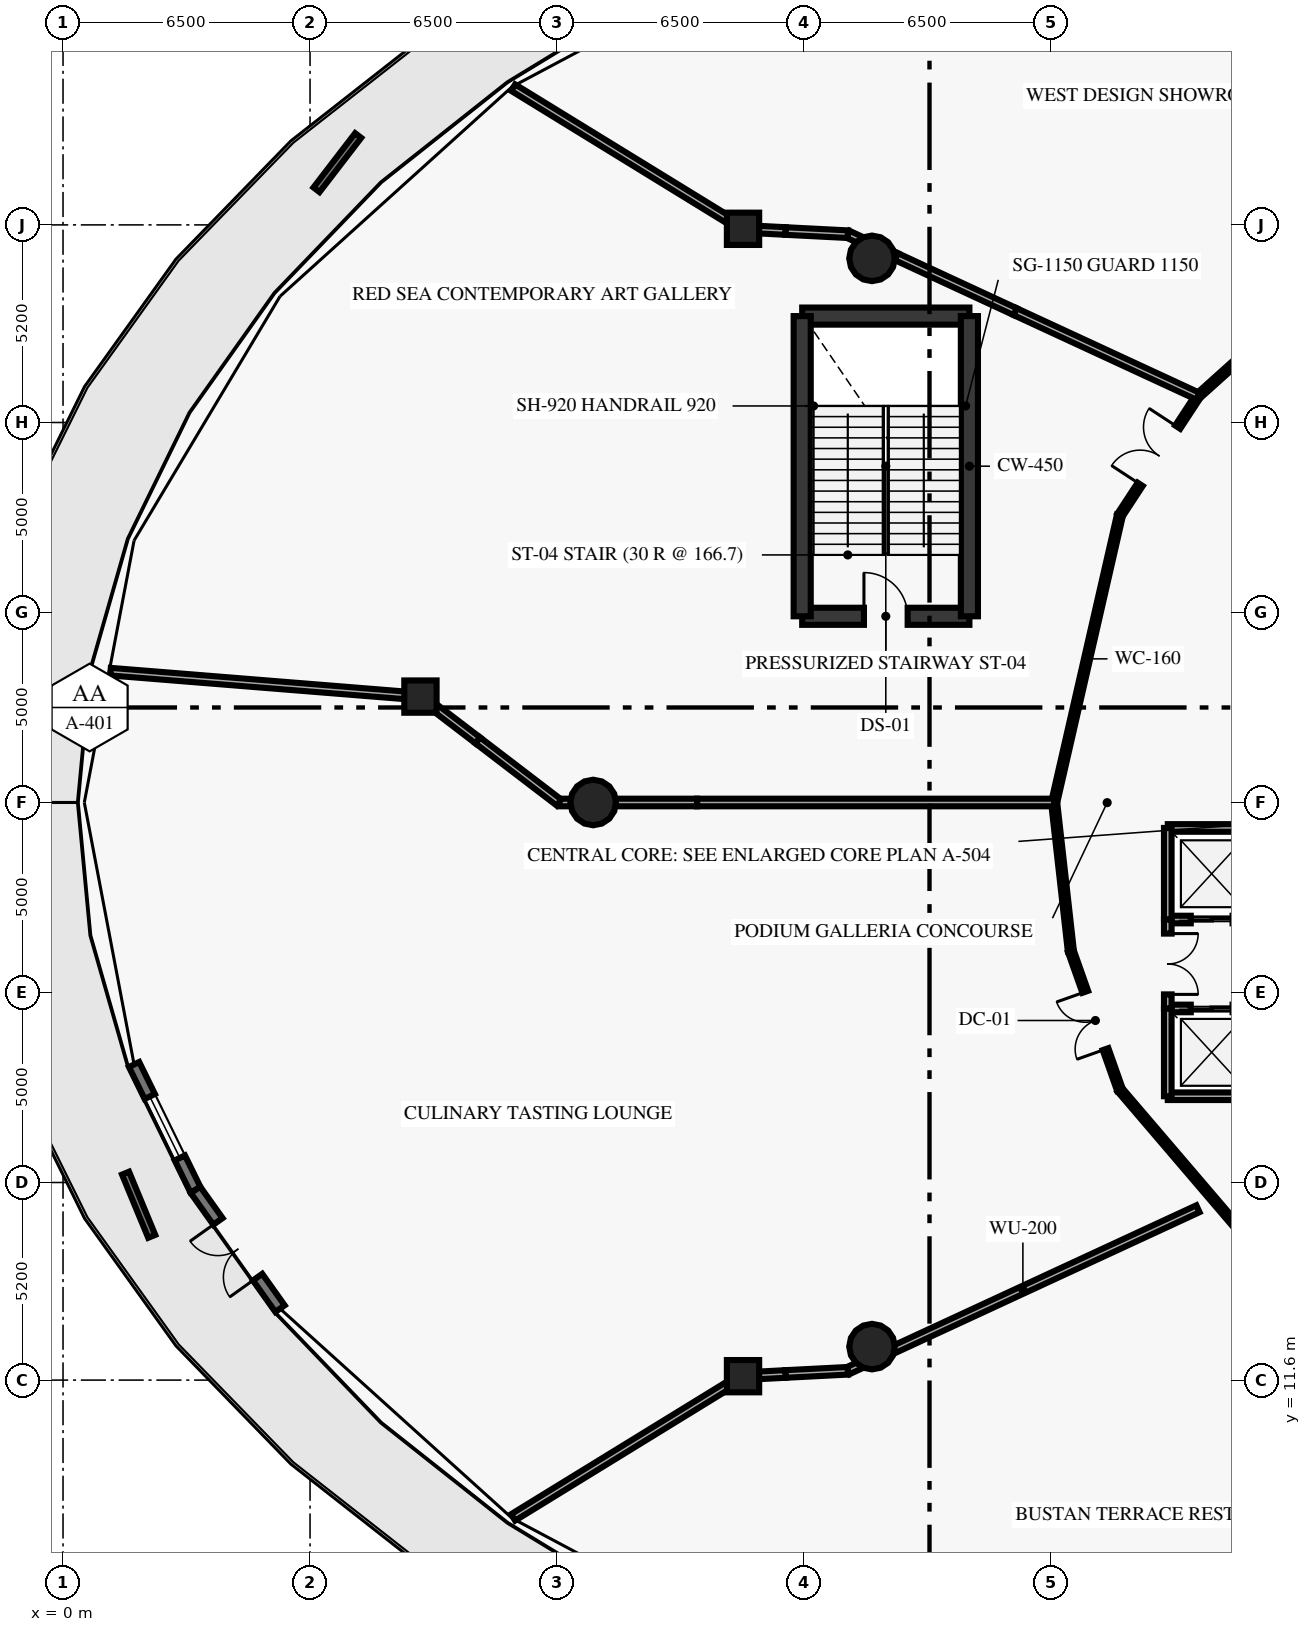
"""IFC4 building model, lengths in metres.
Left out: names, types, materials, properties, quantities, classifications, styles, units other than length and angle.
Written with IfcOpenShell. Run it as: python <this file> out.ifc"""

import sys

from ifc_helpers import new_model, si_unit, direction, frame, frame_2d, origin, origin_2d, place, context, subcontext, project, spatial, rectangle, circle, extrude, element, fill, save


model = new_model("IFC4")
c1 = context("Model", 3, precision=1e-05, world=origin(), true_north=direction((0.0, 1.0)))
c2 = subcontext(c1, "Body", "Model", "MODEL_VIEW")
j1 = project(units=[si_unit("LENGTHUNIT", "METRE"), si_unit("PLANEANGLEUNIT", "RADIAN")], contexts=[c1])
p1 = place(None, origin())
s1 = spatial("IfcSite", under=j1, at=p1, CompositionType="ELEMENT")
p2 = place(p1, origin())
s2 = spatial("IfcBuilding", under=s1, at=p2, CompositionType="ELEMENT")
p3 = place(p2, frame((0.0, 0.0, 6.0)))
s3 = spatial("IfcBuildingStorey", under=s2, at=p3, CompositionType="ELEMENT", Elevation=6.0)
for number, where, z_axis, x_axis in (
    (1, (21.287, 41.119, 0.0), (0.0, 0.0, 1.0), (1.0, 0.0, 0.0)),
    (2, (13.95, 26.8, 0.0), (0.0, 0.0, 1.0), (1.0, 0.0, 0.0)),
    (3, (21.287, 12.481, 0.0), (0.0, 0.0, 1.0), (1.0, 0.0, 0.0)),
):
    element("IfcColumn", number, at=place(p3, frame(where, z_axis=z_axis, x_axis=x_axis)), inside=s3, PredefinedType="COLUMN", context=c2, shape_type="SweptSolid", body=[
        extrude(circle(Radius=0.6, at=origin_2d()), origin(), (0.0, 0.0, 1.0), 4.7),
    ])
for number, where, z_axis, x_axis in (
    (4, (17.893, 41.897, 0.0), (0.0, 0.0, 1.0), (1.0, 0.0, 0.0)),
    (5, (9.405, 29.587, 0.0), (0.0, 0.0, 1.0), (1.0, 0.0, 0.0)),
    (6, (17.893, 11.703, 0.0), (0.0, 0.0, 1.0), (1.0, 0.0, 0.0)),
):
    element("IfcColumn", number, at=place(p3, frame(where, z_axis=z_axis, x_axis=x_axis)), inside=s3, PredefinedType="COLUMN", context=c2, shape_type="SweptSolid", body=[
        extrude(rectangle(XDim=0.85, YDim=0.85, at=origin_2d()), origin(), (0.0, 0.0, 1.0), 4.7),
    ])
p4 = place(p3, frame((3.486, 16.605, 0.0), z_axis=(0.0, 0.0, 1.0), x_axis=(-0.4397832387, 0.89810394886, 0.0)))
e7 = element("IfcWall", 7, at=p4, inside=s3, PredefinedType="STANDARD", context=c2, shape_type="SweptSolid", body=[
    extrude(rectangle(XDim=3.675, YDim=0.3, at=frame_2d((1.837, 0.0))), origin(), (0.0, 0.0, 1.0), 4.7),
])
p5 = place(p4, frame((0.937, 0.0, 0.9)))
e8 = element("IfcOpeningElement", 8, at=p5, cuts=e7, PredefinedType="OPENING", context=c2, shape_type="SweptSolid", body=[
    extrude(rectangle(XDim=1.8, YDim=2.4, at=frame_2d((0.9, 1.2))), frame((0.0, 0.16, 0.0), z_axis=(0.0, -1.0, 0.0), x_axis=(1.0, 0.0, 0.0)), (0.0, 0.0, 1.0), 0.32),
])
p6 = place(p3, frame((5.71, 13.48, 0.0), z_axis=(0.0, 0.0, 1.0), x_axis=(-0.579810280566, 0.814751519514, 0.0)))
e9 = element("IfcWall", 9, at=p6, inside=s3, PredefinedType="STANDARD", context=c2, shape_type="SweptSolid", body=[
    extrude(rectangle(XDim=3.835, YDim=0.3, at=frame_2d((1.918, 0.0))), origin(), (0.0, 0.0, 1.0), 4.7),
])
p7 = place(p6, frame((1.018, 0.0, 0.0)))
e10 = element("IfcOpeningElement", 10, at=p7, cuts=e9, PredefinedType="OPENING", context=c2, shape_type="SweptSolid", body=[
    extrude(rectangle(XDim=1.8, YDim=2.25, at=frame_2d((0.9, 1.125))), frame((0.0, 0.16, 0.0), z_axis=(0.0, -1.0, 0.0), x_axis=(1.0, 0.0, 0.0)), (0.0, 0.0, 1.0), 0.32),
])
p8 = place(p3, frame((6.67, 42.924, 0.0), z_axis=(0.0, 0.0, 1.0), x_axis=(0.608923978219, 0.793228585434, 0.0)))
e11 = element("IfcWall", 11, at=p8, inside=s3, PredefinedType="ELEMENTEDWALL", context=c2, shape_type="SweptSolid", body=[
    extrude(rectangle(XDim=1.8, YDim=0.2, at=frame_2d((0.9, 0.0))), origin(), (0.0, 0.0, 1.0), 0.65),
])
p9 = place(p3, frame((2.334, 15.383, 0.0), z_axis=(0.0, 0.0, 1.0), x_axis=(-0.382775058439, 0.923841574425, 0.0)))
e12 = element("IfcWall", 12, at=p9, inside=s3, PredefinedType="ELEMENTEDWALL", context=c2, shape_type="SweptSolid", body=[
    extrude(rectangle(XDim=1.8, YDim=0.2, at=frame_2d((0.9, 0.0))), origin(), (0.0, 0.0, 1.0), 0.65),
])
p10 = place(p3, frame((19.45, 31.7, 0.0), z_axis=(0.0, 0.0, 1.0), x_axis=(1.0, 0.0, 0.0)))
e13 = element("IfcWall", 13, at=p10, inside=s3, PredefinedType="SHEAR", context=c2, shape_type="SweptSolid", body=[
    extrude(rectangle(XDim=4.4, YDim=0.45, at=frame_2d((2.2, 0.0))), origin(), (0.0, 0.0, 1.0), 4.7),
])
p11 = place(p10, frame((1.625, 0.0, 0.0)))
e14 = element("IfcOpeningElement", 14, at=p11, cuts=e13, PredefinedType="OPENING", context=c2, shape_type="SweptSolid", body=[
    extrude(rectangle(XDim=1.15, YDim=2.15, at=frame_2d((0.575, 1.075))), frame((0.0, 0.235, 0.0), z_axis=(0.0, -1.0, 0.0), x_axis=(1.0, 0.0, 0.0)), (0.0, 0.0, 1.0), 0.47),
])
p12 = place(p3, frame((19.45, 39.6, 0.0), z_axis=(0.0, 0.0, 1.0), x_axis=(1.0, 0.0, 0.0)))
e15 = element("IfcWall", 15, at=p12, inside=s3, PredefinedType="SHEAR", context=c2, shape_type="SweptSolid", body=[
    extrude(rectangle(XDim=4.4, YDim=0.45, at=frame_2d((2.2, 0.0))), origin(), (0.0, 0.0, 1.0), 4.7),
])
for number, where, z_axis, x_axis in (
    (16, (19.45, 31.7, 0.0), (0.0, 0.0, 1.0), (0.0, 1.0, 0.0)),
    (17, (23.85, 31.7, 0.0), (0.0, 0.0, 1.0), (0.0, 1.0, 0.0)),
):
    element("IfcWall", number, at=place(p3, frame(where, z_axis=z_axis, x_axis=x_axis)), inside=s3, PredefinedType="SHEAR", context=c2, shape_type="SweptSolid", body=[
        extrude(rectangle(XDim=7.9, YDim=0.45, at=frame_2d((3.95, 0.0))), origin(), (0.0, 0.0, 1.0), 4.7),
    ])
p13 = place(p3, frame((29.07, 23.72, 0.0), z_axis=(0.0, 0.0, 1.0), x_axis=(1.0, 0.0, 0.0)))
e18 = element("IfcWall", 18, at=p13, inside=s3, PredefinedType="SOLIDWALL", context=c2, shape_type="SweptSolid", body=[
    extrude(rectangle(XDim=2.31, YDim=0.2, at=frame_2d((1.155, 0.0))), origin(), (0.0, 0.0, 1.0), 4.7),
])
p14 = place(p13, frame((0.605, 0.0, 0.0)))
e19 = element("IfcOpeningElement", 19, at=p14, cuts=e18, PredefinedType="OPENING", context=c2, shape_type="SweptSolid", body=[
    extrude(rectangle(XDim=1.1, YDim=2.15, at=frame_2d((0.55, 1.075))), frame((0.0, 0.11, 0.0), z_axis=(0.0, -1.0, 0.0), x_axis=(1.0, 0.0, 0.0)), (0.0, 0.0, 1.0), 0.22),
])
p15 = place(p3, frame((29.07, 26.13, 0.0), z_axis=(0.0, 0.0, 1.0), x_axis=(1.0, 0.0, 0.0)))
e20 = element("IfcWall", 20, at=p15, inside=s3, PredefinedType="SOLIDWALL", context=c2, shape_type="SweptSolid", body=[
    extrude(rectangle(XDim=2.31, YDim=0.2, at=frame_2d((1.155, 0.0))), origin(), (0.0, 0.0, 1.0), 4.7),
])
p16 = place(p3, frame((29.07, 23.72, 0.0), z_axis=(0.0, 0.0, 1.0), x_axis=(0.0, 1.0, 0.0)))
e21 = element("IfcWall", 21, at=p16, inside=s3, PredefinedType="SOLIDWALL", context=c2, shape_type="SweptSolid", body=[
    extrude(rectangle(XDim=2.41, YDim=0.2, at=frame_2d((1.205, 0.0))), origin(), (0.0, 0.0, 1.0), 4.7),
])
p17 = place(p3, frame((29.07, 19.07, 0.0), z_axis=(0.0, 0.0, 1.0), x_axis=(1.0, 0.0, 0.0)))
e22 = element("IfcWall", 22, at=p17, inside=s3, PredefinedType="SOLIDWALL", context=c2, shape_type="SweptSolid", body=[
    extrude(rectangle(XDim=2.31, YDim=0.2, at=frame_2d((1.155, 0.0))), origin(), (0.0, 0.0, 1.0), 4.7),
])
p18 = place(p3, frame((29.07, 21.38, 0.0), z_axis=(0.0, 0.0, 1.0), x_axis=(1.0, 0.0, 0.0)))
e23 = element("IfcWall", 23, at=p18, inside=s3, PredefinedType="SOLIDWALL", context=c2, shape_type="SweptSolid", body=[
    extrude(rectangle(XDim=2.31, YDim=0.2, at=frame_2d((1.155, 0.0))), origin(), (0.0, 0.0, 1.0), 4.7),
])
p19 = place(p18, frame((0.605, 0.0, 0.0)))
e24 = element("IfcOpeningElement", 24, at=p19, cuts=e23, PredefinedType="OPENING", context=c2, shape_type="SweptSolid", body=[
    extrude(rectangle(XDim=1.1, YDim=2.15, at=frame_2d((0.55, 1.075))), frame((0.0, 0.11, 0.0), z_axis=(0.0, -1.0, 0.0), x_axis=(1.0, 0.0, 0.0)), (0.0, 0.0, 1.0), 0.22),
])
p20 = place(p3, frame((29.07, 19.07, 0.0), z_axis=(0.0, 0.0, 1.0), x_axis=(0.0, 1.0, 0.0)))
e25 = element("IfcWall", 25, at=p20, inside=s3, PredefinedType="SOLIDWALL", context=c2, shape_type="SweptSolid", body=[
    extrude(rectangle(XDim=2.31, YDim=0.2, at=frame_2d((1.155, 0.0))), origin(), (0.0, 0.0, 1.0), 4.7),
])
p21 = place(p3, frame((29.07, 21.38, 0.0), z_axis=(0.0, 0.0, 1.0), x_axis=(0.0, 1.0, 0.0)))
e26 = element("IfcWall", 26, at=p21, inside=s3, PredefinedType="SOLIDWALL", context=c2, shape_type="SweptSolid", body=[
    extrude(rectangle(XDim=2.34, YDim=0.2, at=frame_2d((1.17, 0.0))), origin(), (0.0, 0.0, 1.0), 4.7),
])
p22 = place(p21, frame((0.37, 0.0, 0.0)))
e27 = element("IfcOpeningElement", 27, at=p22, cuts=e26, PredefinedType="OPENING", context=c2, shape_type="SweptSolid", body=[
    extrude(rectangle(XDim=1.6, YDim=2.2, at=frame_2d((0.8, 1.1))), frame((0.0, 0.11, 0.0), z_axis=(0.0, -1.0, 0.0), x_axis=(1.0, 0.0, 0.0)), (0.0, 0.0, 1.0), 0.22),
])
p23 = place(p3, frame((32.54, 39.894, 0.0), z_axis=(0.0, 0.0, 1.0), x_axis=(-0.744032872127, -0.668143012531, 0.0)))
e28 = element("IfcWall", 28, at=p23, inside=s3, PredefinedType="PARTITIONING", context=c2, shape_type="SweptSolid", body=[
    extrude(rectangle(XDim=3.597, YDim=0.16, at=frame_2d((1.798, 0.0))), origin(), (0.0, 0.0, 1.0), 4.7),
])
p24 = place(p3, frame((27.811, 34.36, 0.0), z_axis=(0.0, 0.0, 1.0), x_axis=(0.548348738977, 0.836249759619, 0.0)))
e29 = element("IfcWall", 29, at=p24, inside=s3, PredefinedType="PARTITIONING", context=c2, shape_type="SweptSolid", body=[
    extrude(rectangle(XDim=3.744, YDim=0.16, at=frame_2d((1.872, 0.0))), origin(), (0.0, 0.0, 1.0), 4.7),
])
p25 = place(p24, frame((0.972, 0.0, 0.0)))
e30 = element("IfcOpeningElement", 30, at=p25, cuts=e29, PredefinedType="OPENING", context=c2, shape_type="SweptSolid", body=[
    extrude(rectangle(XDim=1.8, YDim=2.3, at=frame_2d((0.9, 1.15))), frame((0.0, 0.09, 0.0), z_axis=(0.0, -1.0, 0.0), x_axis=(1.0, 0.0, 0.0)), (0.0, 0.0, 1.0), 0.18),
])
p26 = place(p3, frame((27.811, 34.36, 0.0), z_axis=(0.0, 0.0, 1.0), x_axis=(-0.223185487206, -0.974775993909, 0.0)))
e31 = element("IfcWall", 31, at=p26, inside=s3, PredefinedType="PARTITIONING", context=c2, shape_type="SweptSolid", body=[
    extrude(rectangle(XDim=7.756, YDim=0.16, at=frame_2d((3.878, 0.0))), origin(), (0.0, 0.0, 1.0), 4.7),
])
p27 = place(p3, frame((26.08, 26.8, 0.0), z_axis=(0.0, 0.0, 1.0), x_axis=(0.111724363671, -0.99373923469, 0.0)))
e32 = element("IfcWall", 32, at=p27, inside=s3, PredefinedType="PARTITIONING", context=c2, shape_type="SweptSolid", body=[
    extrude(rectangle(XDim=3.938, YDim=0.16, at=frame_2d((1.969, 0.0))), origin(), (0.0, 0.0, 1.0), 4.7),
])
p28 = place(p3, frame((27.811, 19.24, 0.0), z_axis=(0.0, 0.0, 1.0), x_axis=(-0.333704620558, 0.942677689467, 0.0)))
e33 = element("IfcWall", 33, at=p28, inside=s3, PredefinedType="PARTITIONING", context=c2, shape_type="SweptSolid", body=[
    extrude(rectangle(XDim=3.869, YDim=0.16, at=frame_2d((1.934, 0.0))), origin(), (0.0, 0.0, 1.0), 4.7),
])
p29 = place(p28, frame((1.134, 0.0, 0.0)))
e34 = element("IfcOpeningElement", 34, at=p29, cuts=e33, PredefinedType="OPENING", context=c2, shape_type="SweptSolid", body=[
    extrude(rectangle(XDim=1.6, YDim=2.2, at=frame_2d((0.8, 1.1))), frame((0.0, 0.09, 0.0), z_axis=(0.0, -1.0, 0.0), x_axis=(1.0, 0.0, 0.0)), (0.0, 0.0, 1.0), 0.18),
])
p30 = place(p3, frame((27.811, 19.24, 0.0), z_axis=(0.0, 0.0, 1.0), x_axis=(0.649652680018, -0.760231145998, 0.0)))
e35 = element("IfcWall", 35, at=p30, inside=s3, PredefinedType="PARTITIONING", context=c2, shape_type="SweptSolid", body=[
    extrude(rectangle(XDim=7.279, YDim=0.16, at=frame_2d((3.64, 0.0))), origin(), (0.0, 0.0, 1.0), 4.7),
])
p31 = place(p3, frame((29.864, 37.491, 0.0), z_axis=(0.0, 0.0, 1.0), x_axis=(-0.907524785669, 0.419998527851, 0.0)))
e36 = element("IfcWall", 36, at=p31, inside=s3, PredefinedType="PARTITIONING", context=c2, shape_type="SweptSolid", body=[
    extrude(rectangle(XDim=5.3, YDim=0.2, at=frame_2d((2.65, 0.0))), origin(), (0.0, 0.0, 1.0), 4.7),
])
p32 = place(p3, frame((25.054, 39.717, 0.0), z_axis=(0.0, 0.0, 1.0), x_axis=(-0.90747190463, 0.420112773321, 0.0)))
e37 = element("IfcWall", 37, at=p32, inside=s3, PredefinedType="PARTITIONING", context=c2, shape_type="SweptSolid", body=[
    extrude(rectangle(XDim=3.449, YDim=0.2, at=frame_2d((1.725, 0.0))), origin(), (0.0, 0.0, 1.0), 3.92),
])
p33 = place(p3, frame((21.924, 41.166, 0.0), z_axis=(0.0, 0.0, 1.0), x_axis=(-0.907622896373, 0.419786467124, 0.0)))
e38 = element("IfcWall", 38, at=p33, inside=s3, PredefinedType="PARTITIONING", context=c2, shape_type="SweptSolid", body=[
    extrude(rectangle(XDim=1.403, YDim=0.2, at=frame_2d((0.701, 0.0))), origin(), (0.0, 0.0, 1.0), 4.7),
])
p34 = place(p3, frame((20.651, 41.755, 0.0), z_axis=(0.0, 0.0, 1.0), x_axis=(-0.998685128887, 0.051264152576, 0.0)))
e39 = element("IfcWall", 39, at=p34, inside=s3, PredefinedType="PARTITIONING", context=c2, shape_type="SweptSolid", body=[
    extrude(rectangle(XDim=1.643, YDim=0.2, at=frame_2d((0.822, 0.0))), origin(), (0.0, 0.0, 1.0), 4.7),
])
p35 = place(p3, frame((19.01, 41.839, 0.0), z_axis=(0.0, 0.0, 1.0), x_axis=(-0.998660904733, 0.051733909163, 0.0)))
e40 = element("IfcWall", 40, at=p35, inside=s3, PredefinedType="PARTITIONING", context=c2, shape_type="SweptSolid", body=[
    extrude(rectangle(XDim=1.118, YDim=0.2, at=frame_2d((0.559, 0.0))), origin(), (0.0, 0.0, 1.0), 4.24),
])
p36 = place(p3, frame((17.893, 41.897, 0.0), z_axis=(0.0, 0.0, 1.0), x_axis=(-0.85206305886, 0.523439149974, 0.0)))
e41 = element("IfcWall", 41, at=p36, inside=s3, PredefinedType="PARTITIONING", context=c2, shape_type="SweptSolid", body=[
    extrude(rectangle(XDim=7.099, YDim=0.2, at=frame_2d((3.55, 0.0))), origin(), (0.0, 0.0, 1.0), 4.7),
])
p37 = place(p3, frame((26.08, 26.8, 0.0), z_axis=(0.0, 0.0, 1.0), x_axis=(-1.0, 0.0, 0.0)))
e42 = element("IfcWall", 42, at=p37, inside=s3, PredefinedType="PARTITIONING", context=c2, shape_type="SweptSolid", body=[
    extrude(rectangle(XDim=9.397, YDim=0.2, at=frame_2d((4.698, 0.0))), origin(), (0.0, 0.0, 1.0), 4.7),
])
p38 = place(p3, frame((16.683, 26.8, 0.0), z_axis=(0.0, 0.0, 1.0), x_axis=(-1.0, 0.0, 0.0)))
e43 = element("IfcWall", 43, at=p38, inside=s3, PredefinedType="PARTITIONING", context=c2, shape_type="SweptSolid", body=[
    extrude(rectangle(XDim=2.744, YDim=0.2, at=frame_2d((1.372, 0.0))), origin(), (0.0, 0.0, 1.0), 3.66),
])
p39 = place(p3, frame((13.939, 26.8, 0.0), z_axis=(0.0, 0.0, 1.0), x_axis=(-1.0, 0.0, 0.0)))
e44 = element("IfcWall", 44, at=p39, inside=s3, PredefinedType="PARTITIONING", context=c2, shape_type="SweptSolid", body=[
    extrude(rectangle(XDim=0.889, YDim=0.2, at=frame_2d((0.444, 0.0))), origin(), (0.0, 0.0, 1.0), 4.7),
])
p40 = place(p3, frame((13.05, 26.8, 0.0), z_axis=(0.0, 0.0, 1.0), x_axis=(-0.794337234882, 0.607477042595, 0.0)))
e45 = element("IfcWall", 45, at=p40, inside=s3, PredefinedType="PARTITIONING", context=c2, shape_type="SweptSolid", body=[
    extrude(rectangle(XDim=2.691, YDim=0.2, at=frame_2d((1.346, 0.0))), origin(), (0.0, 0.0, 1.0), 4.7),
])
p41 = place(p3, frame((10.912, 28.435, 0.0), z_axis=(0.0, 0.0, 1.0), x_axis=(-0.794514897702, 0.607244660191, 0.0)))
e46 = element("IfcWall", 46, at=p41, inside=s3, PredefinedType="PARTITIONING", context=c2, shape_type="SweptSolid", body=[
    extrude(rectangle(XDim=1.897, YDim=0.2, at=frame_2d((0.948, 0.0))), origin(), (0.0, 0.0, 1.0), 4.24),
])
p42 = place(p3, frame((9.405, 29.587, 0.0), z_axis=(0.0, 0.0, 1.0), x_axis=(-0.996780937532, 0.080173328319, 0.0)))
e47 = element("IfcWall", 47, at=p42, inside=s3, PredefinedType="PARTITIONING", context=c2, shape_type="SweptSolid", body=[
    extrude(rectangle(XDim=8.182, YDim=0.2, at=frame_2d((4.091, 0.0))), origin(), (0.0, 0.0, 1.0), 4.7),
])
p43 = place(p3, frame((29.864, 16.109, 0.0), z_axis=(0.0, 0.0, 1.0), x_axis=(-0.907520382507, -0.420008041988, 0.0)))
e48 = element("IfcWall", 48, at=p43, inside=s3, PredefinedType="PARTITIONING", context=c2, shape_type="SweptSolid", body=[
    extrude(rectangle(XDim=10.152, YDim=0.2, at=frame_2d((5.076, 0.0))), origin(), (0.0, 0.0, 1.0), 4.7),
])
p44 = place(p3, frame((20.651, 11.845, 0.0), z_axis=(0.0, 0.0, 1.0), x_axis=(-0.998692725363, -0.051115949639, 0.0)))
e49 = element("IfcWall", 49, at=p44, inside=s3, PredefinedType="PARTITIONING", context=c2, shape_type="SweptSolid", body=[
    extrude(rectangle(XDim=1.643, YDim=0.2, at=frame_2d((0.822, 0.0))), origin(), (0.0, 0.0, 1.0), 4.7),
])
p45 = place(p3, frame((19.01, 11.761, 0.0), z_axis=(0.0, 0.0, 1.0), x_axis=(-0.998649603439, -0.051951607785, 0.0)))
e50 = element("IfcWall", 50, at=p45, inside=s3, PredefinedType="PARTITIONING", context=c2, shape_type="SweptSolid", body=[
    extrude(rectangle(XDim=1.118, YDim=0.2, at=frame_2d((0.559, 0.0))), origin(), (0.0, 0.0, 1.0), 4.24),
])
p46 = place(p3, frame((17.893, 11.703, 0.0), z_axis=(0.0, 0.0, 1.0), x_axis=(-0.852078396496, -0.523414182293, 0.0)))
e51 = element("IfcWall", 51, at=p46, inside=s3, PredefinedType="PARTITIONING", context=c2, shape_type="SweptSolid", body=[
    extrude(rectangle(XDim=7.099, YDim=0.2, at=frame_2d((3.55, 0.0))), origin(), (0.0, 0.0, 1.0), 4.7),
])
p47 = place(p5, origin())
e52 = element("IfcWindow", 52, at=p47, inside=s3, PartitioningType="DOUBLE_PANEL_VERTICAL", PredefinedType="WINDOW", context=c2, shape_type="SweptSolid", body=[
    extrude(rectangle(XDim=1.8, YDim=2.4, at=frame_2d((0.9, 1.2))), frame((0.0, 0.03, 0.0), z_axis=(0.0, -1.0, 0.0), x_axis=(1.0, 0.0, 0.0)), (0.0, 0.0, 1.0), 0.06),
])
fill(e8, e52)
p48 = place(p7, origin())
e53 = element("IfcDoor", 53, at=p48, inside=s3, OperationType="DOUBLE_DOOR_SINGLE_SWING", PredefinedType="DOOR", context=c2, shape_type="SweptSolid", body=[
    extrude(rectangle(XDim=1.8, YDim=2.25, at=frame_2d((0.9, 1.125))), frame((0.0, 0.025, 0.0), z_axis=(0.0, -1.0, 0.0), x_axis=(1.0, 0.0, 0.0)), (0.0, 0.0, 1.0), 0.05),
])
fill(e10, e53)
p49 = place(p11, origin())
e54 = element("IfcDoor", 54, at=p49, inside=s3, OperationType="SINGLE_SWING_LEFT", PredefinedType="DOOR", context=c2, shape_type="SweptSolid", body=[
    extrude(rectangle(XDim=1.15, YDim=2.15, at=frame_2d((0.575, 1.075))), frame((0.0, 0.025, 0.0), z_axis=(0.0, -1.0, 0.0), x_axis=(1.0, 0.0, 0.0)), (0.0, 0.0, 1.0), 0.05),
])
fill(e14, e54)
p50 = place(p14, origin())
e55 = element("IfcDoor", 55, at=p50, inside=s3, OperationType="DOUBLE_DOOR_SLIDING", PredefinedType="DOOR", context=c2, shape_type="SweptSolid", body=[
    extrude(rectangle(XDim=1.1, YDim=2.15, at=frame_2d((0.55, 1.075))), frame((0.0, 0.025, 0.0), z_axis=(0.0, -1.0, 0.0), x_axis=(1.0, 0.0, 0.0)), (0.0, 0.0, 1.0), 0.05),
])
fill(e19, e55)
p51 = place(p19, origin())
e56 = element("IfcDoor", 56, at=p51, inside=s3, OperationType="DOUBLE_DOOR_SLIDING", PredefinedType="DOOR", context=c2, shape_type="SweptSolid", body=[
    extrude(rectangle(XDim=1.1, YDim=2.15, at=frame_2d((0.55, 1.075))), frame((0.0, 0.025, 0.0), z_axis=(0.0, -1.0, 0.0), x_axis=(1.0, 0.0, 0.0)), (0.0, 0.0, 1.0), 0.05),
])
fill(e24, e56)
p52 = place(p22, origin())
e57 = element("IfcDoor", 57, at=p52, inside=s3, OperationType="DOUBLE_DOOR_SINGLE_SWING", PredefinedType="DOOR", context=c2, shape_type="SweptSolid", body=[
    extrude(rectangle(XDim=1.6, YDim=2.2, at=frame_2d((0.8, 1.1))), frame((0.0, 0.025, 0.0), z_axis=(0.0, -1.0, 0.0), x_axis=(1.0, 0.0, 0.0)), (0.0, 0.0, 1.0), 0.05),
])
fill(e27, e57)
p53 = place(p25, origin())
e58 = element("IfcDoor", 58, at=p53, inside=s3, OperationType="DOUBLE_DOOR_SINGLE_SWING", PredefinedType="DOOR", context=c2, shape_type="SweptSolid", body=[
    extrude(rectangle(XDim=1.8, YDim=2.3, at=frame_2d((0.9, 1.15))), frame((0.0, 0.025, 0.0), z_axis=(0.0, -1.0, 0.0), x_axis=(1.0, 0.0, 0.0)), (0.0, 0.0, 1.0), 0.05),
])
fill(e30, e58)
p54 = place(p29, origin())
e59 = element("IfcDoor", 59, at=p54, inside=s3, OperationType="DOUBLE_DOOR_SINGLE_SWING", PredefinedType="DOOR", context=c2, shape_type="SweptSolid", body=[
    extrude(rectangle(XDim=1.6, YDim=2.2, at=frame_2d((0.8, 1.1))), frame((0.0, 0.025, 0.0), z_axis=(0.0, -1.0, 0.0), x_axis=(1.0, 0.0, 0.0)), (0.0, 0.0, 1.0), 0.05),
])
fill(e34, e59)
save(model, sys.argv[1])
